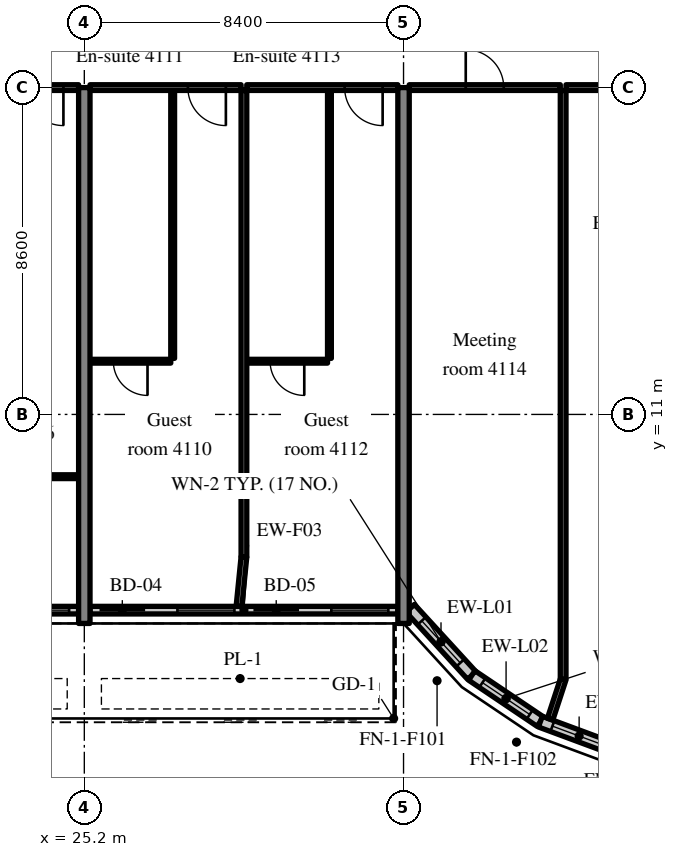
"""IFC4 building model, lengths in metres.
Left out: names, types, materials, properties, quantities, classifications, styles, units other than length and angle.
Written with IfcOpenShell. Run it as: python <this file> out.ifc"""

import sys

from ifc_helpers import new_model, si_unit, direction, frame, frame_2d, origin, place, context, subcontext, project, spatial, rectangle, extrude, source, transform, mapped, element, fill, save


model = new_model("IFC4")
c1 = context("Model", 3, precision=1e-05, world=origin(), true_north=direction((0.0, 1.0)))
c2 = subcontext(c1, "Body", "Model", "MODEL_VIEW")
j1 = project(units=[si_unit("LENGTHUNIT", "METRE"), si_unit("PLANEANGLEUNIT", "RADIAN")], contexts=[c1])
p1 = place(None, origin())
s1 = spatial("IfcSite", under=j1, at=p1, CompositionType="ELEMENT")
p2 = place(p1, origin())
s2 = spatial("IfcBuilding", under=s1, at=p2, CompositionType="ELEMENT")
p3 = place(p2, frame((0.0, 0.0, 170.6)))
s3 = spatial("IfcBuildingStorey", under=s2, at=p3, CompositionType="ELEMENT", Elevation=170.6)
m1 = source(origin(), c2, "Body", "SweptSolid", [
    extrude(rectangle(XDim=14.1, YDim=0.3, at=frame_2d((7.05, 0.0))), origin(), (0.0, 0.0, 1.0), 3.52),
])
for number, where, z_axis, x_axis in (
    (1, (25.2, 5.5, 0.0), (0.0, 0.0, 1.0), (0.0, 1.0, 0.0)),
    (2, (33.6, 5.5, 0.0), (0.0, 0.0, 1.0), (0.0, 1.0, 0.0)),
):
    element("IfcWall", number, at=place(p3, frame(where, z_axis=z_axis, x_axis=x_axis)), inside=s3, PredefinedType="SHEAR", context=c2, shape_type="MappedRepresentation", body=[
        mapped(m1, transform((0.0, 0.0, 0.0), scale=1.0)),
    ])
m2 = source(origin(), c2, "Body", "SweptSolid", [
    extrude(rectangle(XDim=8.1, YDim=0.2, at=frame_2d((4.05, 0.0))), origin(), (0.0, 0.0, 1.0), 2.87),
])
p4 = place(p3, frame((16.95, 5.85, 0.0), z_axis=(0.0, 0.0, 1.0), x_axis=(1.0, 0.0, 0.0)))
e3 = element("IfcWall", 3, at=p4, inside=s3, PredefinedType="SOLIDWALL", context=c2, shape_type="MappedRepresentation", body=[
    mapped(m2, transform((0.0, 0.0, 0.0), scale=1.0)),
])
m3 = source(origin(), c2, "Body", "SweptSolid", [
    extrude(rectangle(XDim=1.2, YDim=2.4, at=frame_2d((0.6, 1.2))), frame((0.0, 0.11, 0.0), z_axis=(0.0, -1.0, 0.0), x_axis=(1.0, 0.0, 0.0)), (0.0, 0.0, 1.0), 0.22),
])
p5 = place(p4, frame((0.25, 0.0, 0.0)))
e4 = element("IfcOpeningElement", 4, at=p5, cuts=e3, PredefinedType="OPENING", context=c2, shape_type="MappedRepresentation", body=[
    mapped(m3, transform((0.0, 0.0, 0.0), scale=1.0)),
])
m4 = source(origin(), c2, "Body", "SweptSolid", [
    extrude(rectangle(XDim=1.5, YDim=1.5, at=frame_2d((0.75, 0.75))), frame((0.0, 0.11, 0.0), z_axis=(0.0, -1.0, 0.0), x_axis=(1.0, 0.0, 0.0)), (0.0, 0.0, 1.0), 0.22),
])
p6 = place(p4, frame((2.3, 0.0, 0.9)))
e5 = element("IfcOpeningElement", 5, at=p6, cuts=e3, PredefinedType="OPENING", context=c2, shape_type="MappedRepresentation", body=[
    mapped(m4, transform((0.0, 0.0, 0.0), scale=1.0)),
])
p7 = place(p4, frame((4.3, 0.0, 0.0)))
e6 = element("IfcOpeningElement", 6, at=p7, cuts=e3, PredefinedType="OPENING", context=c2, shape_type="MappedRepresentation", body=[
    mapped(m3, transform((0.0, 0.0, 0.0), scale=1.0)),
])
p8 = place(p4, frame((6.35, 0.0, 0.9)))
e7 = element("IfcOpeningElement", 7, at=p8, cuts=e3, PredefinedType="OPENING", context=c2, shape_type="MappedRepresentation", body=[
    mapped(m4, transform((0.0, 0.0, 0.0), scale=1.0)),
])
m5 = source(origin(), c2, "Body", "SweptSolid", [
    extrude(rectangle(XDim=8.1, YDim=0.2, at=frame_2d((4.05, 0.0))), origin(), (0.0, 0.0, 1.0), 2.87),
])
p9 = place(p3, frame((25.35, 5.85, 0.0), z_axis=(0.0, 0.0, 1.0), x_axis=(1.0, 0.0, 0.0)))
e8 = element("IfcWall", 8, at=p9, inside=s3, PredefinedType="SOLIDWALL", context=c2, shape_type="MappedRepresentation", body=[
    mapped(m5, transform((0.0, 0.0, 0.0), scale=1.0)),
])
p10 = place(p9, frame((0.25, 0.0, 0.0)))
e9 = element("IfcOpeningElement", 9, at=p10, cuts=e8, PredefinedType="OPENING", context=c2, shape_type="MappedRepresentation", body=[
    mapped(m3, transform((0.0, 0.0, 0.0), scale=1.0)),
])
p11 = place(p9, frame((2.3, 0.0, 0.9)))
e10 = element("IfcOpeningElement", 10, at=p11, cuts=e8, PredefinedType="OPENING", context=c2, shape_type="MappedRepresentation", body=[
    mapped(m4, transform((0.0, 0.0, 0.0), scale=1.0)),
])
p12 = place(p9, frame((4.3, 0.0, 0.0)))
e11 = element("IfcOpeningElement", 11, at=p12, cuts=e8, PredefinedType="OPENING", context=c2, shape_type="MappedRepresentation", body=[
    mapped(m3, transform((0.0, 0.0, 0.0), scale=1.0)),
])
p13 = place(p9, frame((6.35, 0.0, 0.9)))
e12 = element("IfcOpeningElement", 12, at=p13, cuts=e8, PredefinedType="OPENING", context=c2, shape_type="MappedRepresentation", body=[
    mapped(m4, transform((0.0, 0.0, 0.0), scale=1.0)),
])
m6 = source(origin(), c2, "Body", "SweptSolid", [
    extrude(rectangle(XDim=2.398, YDim=0.3, at=frame_2d((1.199, 0.0))), origin(), (0.0, 0.0, 1.0), 3.52),
])
p14 = place(p3, frame((33.776, 5.9, 0.0), z_axis=(0.0, 0.0, 1.0), x_axis=(0.675374189419, -0.737475222815, 0.0)))
e13 = element("IfcWall", 13, at=p14, inside=s3, PredefinedType="SOLIDWALL", context=c2, shape_type="MappedRepresentation", body=[
    mapped(m6, transform((0.0, 0.0, 0.0), scale=1.0)),
])
m7 = source(origin(), c2, "Body", "SweptSolid", [
    extrude(rectangle(XDim=1.5, YDim=2.0, at=frame_2d((0.75, 1.0))), frame((0.0, 0.16, 0.0), z_axis=(0.0, -1.0, 0.0), x_axis=(1.0, 0.0, 0.0)), (0.0, 0.0, 1.0), 0.32),
])
p15 = place(p14, frame((0.449, 0.0, 0.9)))
e14 = element("IfcOpeningElement", 14, at=p15, cuts=e13, PredefinedType="OPENING", context=c2, shape_type="MappedRepresentation", body=[
    mapped(m7, transform((0.0, 0.0, 0.0), scale=1.0)),
])
m8 = source(origin(), c2, "Body", "SweptSolid", [
    extrude(rectangle(XDim=2.176, YDim=0.3, at=frame_2d((1.088, 0.0))), origin(), (0.0, 0.0, 1.0), 3.52),
])
p16 = place(p3, frame((35.396, 4.131, 0.0), z_axis=(0.0, 0.0, 1.0), x_axis=(0.829590746428, -0.558371913192, 0.0)))
e15 = element("IfcWall", 15, at=p16, inside=s3, PredefinedType="SOLIDWALL", context=c2, shape_type="MappedRepresentation", body=[
    mapped(m8, transform((0.0, 0.0, 0.0), scale=1.0)),
])
p17 = place(p16, frame((0.338, 0.0, 0.9)))
e16 = element("IfcOpeningElement", 16, at=p17, cuts=e15, PredefinedType="OPENING", context=c2, shape_type="MappedRepresentation", body=[
    mapped(m7, transform((0.0, 0.0, 0.0), scale=1.0)),
])
p18 = place(p3, frame((37.201, 2.917, 0.0), z_axis=(0.0, 0.0, 1.0), x_axis=(0.93754555999, -0.347862505801, 0.0)))
e17 = element("IfcWall", 17, at=p18, inside=s3, PredefinedType="SOLIDWALL", context=c2, shape_type="MappedRepresentation", body=[
    mapped(m8, transform((0.0, 0.0, 0.0), scale=1.0)),
])
p19 = place(p18, frame((0.338, 0.0, 0.9)))
e18 = element("IfcOpeningElement", 18, at=p19, cuts=e17, PredefinedType="OPENING", context=c2, shape_type="MappedRepresentation", body=[
    mapped(m7, transform((0.0, 0.0, 0.0), scale=1.0)),
])
m9 = source(origin(), c2, "Body", "SweptSolid", [
    extrude(rectangle(XDim=8.1, YDim=0.1, at=frame_2d((4.05, 0.0))), origin(), (0.0, 0.0, 1.0), 3.52),
])
p20 = place(p3, frame((16.95, 9.362, 0.0), z_axis=(0.0, 0.0, 1.0), x_axis=(1.0, 0.0, 0.0)))
e19 = element("IfcWall", 19, at=p20, inside=s3, PredefinedType="PARTITIONING", context=c2, shape_type="MappedRepresentation", body=[
    mapped(m9, transform((0.0, 0.0, 0.0), scale=1.0)),
])
m10 = source(origin(), c2, "Body", "SweptSolid", [
    extrude(rectangle(XDim=1.8, YDim=2.1, at=frame_2d((0.9, 1.05))), frame((0.0, 0.06, 0.0), z_axis=(0.0, -1.0, 0.0), x_axis=(1.0, 0.0, 0.0)), (0.0, 0.0, 1.0), 0.12),
])
p21 = place(p20, frame((3.15, 0.0, 0.0)))
e20 = element("IfcOpeningElement", 20, at=p21, cuts=e19, PredefinedType="OPENING", context=c2, shape_type="MappedRepresentation", body=[
    mapped(m10, transform((0.0, 0.0, 0.0), scale=1.0)),
])
m11 = source(origin(), c2, "Body", "SweptSolid", [
    extrude(rectangle(XDim=8.1, YDim=0.15, at=frame_2d((4.05, 0.0))), origin(), (0.0, 0.0, 1.0), 2.82),
])
p22 = place(p3, frame((16.95, 19.6, 0.0), z_axis=(0.0, 0.0, 1.0), x_axis=(1.0, 0.0, 0.0)))
e21 = element("IfcWall", 21, at=p22, inside=s3, PredefinedType="PARTITIONING", context=c2, shape_type="MappedRepresentation", body=[
    mapped(m11, transform((0.0, 0.0, 0.0), scale=1.0)),
])
m12 = source(origin(), c2, "Body", "SweptSolid", [
    extrude(rectangle(XDim=1.0, YDim=2.1, at=frame_2d((0.5, 1.05))), frame((0.0, 0.085, 0.0), z_axis=(0.0, -1.0, 0.0), x_axis=(1.0, 0.0, 0.0)), (0.0, 0.0, 1.0), 0.17),
])
p23 = place(p22, frame((6.7, 0.0, 0.0)))
e22 = element("IfcOpeningElement", 22, at=p23, cuts=e21, PredefinedType="OPENING", context=c2, shape_type="MappedRepresentation", body=[
    mapped(m12, transform((0.0, 0.0, 0.0), scale=1.0)),
])
m13 = source(origin(), c2, "Body", "SweptSolid", [
    extrude(rectangle(XDim=7.05, YDim=0.1, at=frame_2d((3.525, 0.0))), origin(), (0.0, 0.0, 1.0), 3.52),
])
p24 = place(p3, frame((27.525, 12.475, 0.0), z_axis=(0.0, 0.0, 1.0), x_axis=(0.0, 1.0, 0.0)))
e23 = element("IfcWall", 23, at=p24, inside=s3, PredefinedType="PARTITIONING", context=c2, shape_type="MappedRepresentation", body=[
    mapped(m13, transform((0.0, 0.0, 0.0), scale=1.0)),
])
m14 = source(origin(), c2, "Body", "SweptSolid", [
    extrude(rectangle(XDim=2.125, YDim=0.1, at=frame_2d((1.062, 0.0))), origin(), (0.0, 0.0, 1.0), 3.52),
])
p25 = place(p3, frame((25.35, 12.4, 0.0), z_axis=(0.0, 0.0, 1.0), x_axis=(1.0, 0.0, 0.0)))
e24 = element("IfcWall", 24, at=p25, inside=s3, PredefinedType="PARTITIONING", context=c2, shape_type="MappedRepresentation", body=[
    mapped(m14, transform((0.0, 0.0, 0.0), scale=1.0)),
])
m15 = source(origin(), c2, "Body", "SweptSolid", [
    extrude(rectangle(XDim=0.9, YDim=2.1, at=frame_2d((0.45, 1.05))), frame((0.0, 0.06, 0.0), z_axis=(0.0, -1.0, 0.0), x_axis=(1.0, 0.0, 0.0)), (0.0, 0.0, 1.0), 0.12),
])
p26 = place(p25, frame((0.613, 0.0, 0.0)))
e25 = element("IfcOpeningElement", 25, at=p26, cuts=e24, PredefinedType="OPENING", context=c2, shape_type="MappedRepresentation", body=[
    mapped(m15, transform((0.0, 0.0, 0.0), scale=1.0)),
])
m16 = source(origin(), c2, "Body", "SweptSolid", [
    extrude(rectangle(XDim=3.975, YDim=0.15, at=frame_2d((1.987, 0.0))), origin(), (0.0, 0.0, 1.0), 2.82),
])
p27 = place(p3, frame((25.35, 19.6, 0.0), z_axis=(0.0, 0.0, 1.0), x_axis=(1.0, 0.0, 0.0)))
e26 = element("IfcWall", 26, at=p27, inside=s3, PredefinedType="PARTITIONING", context=c2, shape_type="MappedRepresentation", body=[
    mapped(m16, transform((0.0, 0.0, 0.0), scale=1.0)),
])
p28 = place(p27, frame((2.575, 0.0, 0.0)))
e27 = element("IfcOpeningElement", 27, at=p28, cuts=e26, PredefinedType="OPENING", context=c2, shape_type="MappedRepresentation", body=[
    mapped(m12, transform((0.0, 0.0, 0.0), scale=1.0)),
])
p29 = place(p3, frame((31.65, 12.475, 0.0), z_axis=(0.0, 0.0, 1.0), x_axis=(0.0, 1.0, 0.0)))
e28 = element("IfcWall", 28, at=p29, inside=s3, PredefinedType="PARTITIONING", context=c2, shape_type="MappedRepresentation", body=[
    mapped(m13, transform((0.0, 0.0, 0.0), scale=1.0)),
])
p30 = place(p3, frame((29.475, 12.4, 0.0), z_axis=(0.0, 0.0, 1.0), x_axis=(1.0, 0.0, 0.0)))
e29 = element("IfcWall", 29, at=p30, inside=s3, PredefinedType="PARTITIONING", context=c2, shape_type="MappedRepresentation", body=[
    mapped(m14, transform((0.0, 0.0, 0.0), scale=1.0)),
])
p31 = place(p30, frame((0.613, 0.0, 0.0)))
e30 = element("IfcOpeningElement", 30, at=p31, cuts=e29, PredefinedType="OPENING", context=c2, shape_type="MappedRepresentation", body=[
    mapped(m15, transform((0.0, 0.0, 0.0), scale=1.0)),
])
p32 = place(p3, frame((29.475, 19.6, 0.0), z_axis=(0.0, 0.0, 1.0), x_axis=(1.0, 0.0, 0.0)))
e31 = element("IfcWall", 31, at=p32, inside=s3, PredefinedType="PARTITIONING", context=c2, shape_type="MappedRepresentation", body=[
    mapped(m16, transform((0.0, 0.0, 0.0), scale=1.0)),
])
p33 = place(p32, frame((2.575, 0.0, 0.0)))
e32 = element("IfcOpeningElement", 32, at=p33, cuts=e31, PredefinedType="OPENING", context=c2, shape_type="MappedRepresentation", body=[
    mapped(m12, transform((0.0, 0.0, 0.0), scale=1.0)),
])
m17 = source(origin(), c2, "Body", "SweptSolid", [
    extrude(rectangle(XDim=12.275, YDim=0.15, at=frame_2d((6.137, 0.0))), origin(), (0.0, 0.0, 1.0), 3.52),
])
p34 = place(p3, frame((29.4, 7.25, 0.0), z_axis=(0.0, 0.0, 1.0), x_axis=(0.0, 1.0, 0.0)))
e33 = element("IfcWall", 33, at=p34, inside=s3, PredefinedType="PARTITIONING", context=c2, shape_type="MappedRepresentation", body=[
    mapped(m17, transform((0.0, 0.0, 0.0), scale=1.0)),
])
m18 = source(origin(), c2, "Body", "SweptSolid", [
    extrude(rectangle(XDim=3.975, YDim=0.15, at=frame_2d((1.988, 0.0))), origin(), (0.0, 0.0, 1.0), 2.82),
])
p35 = place(p3, frame((33.75, 19.6, 0.0), z_axis=(0.0, 0.0, 1.0), x_axis=(1.0, 0.0, 0.0)))
e34 = element("IfcWall", 34, at=p35, inside=s3, PredefinedType="PARTITIONING", context=c2, shape_type="MappedRepresentation", body=[
    mapped(m18, transform((0.0, 0.0, 0.0), scale=1.0)),
])
p36 = place(p35, frame((1.487, 0.0, 0.0)))
e35 = element("IfcOpeningElement", 35, at=p36, cuts=e34, PredefinedType="OPENING", context=c2, shape_type="MappedRepresentation", body=[
    mapped(m12, transform((0.0, 0.0, 0.0), scale=1.0)),
])
p37 = place(p3, frame((37.875, 19.6, 0.0), z_axis=(0.0, 0.0, 1.0), x_axis=(1.0, 0.0, 0.0)))
e36 = element("IfcWall", 36, at=p37, inside=s3, PredefinedType="PARTITIONING", context=c2, shape_type="MappedRepresentation", body=[
    mapped(m18, transform((0.0, 0.0, 0.0), scale=1.0)),
])
p38 = place(p37, frame((1.487, 0.0, 0.0)))
e37 = element("IfcOpeningElement", 37, at=p38, cuts=e36, PredefinedType="OPENING", context=c2, shape_type="MappedRepresentation", body=[
    mapped(m12, transform((0.0, 0.0, 0.0), scale=1.0)),
])
m19 = source(origin(), c2, "Body", "SweptSolid", [
    extrude(rectangle(XDim=15.498, YDim=0.15, at=frame_2d((7.749, 0.0))), origin(), (0.0, 0.0, 1.0), 3.52),
])
p39 = place(p3, frame((37.8, 4.027, 0.0), z_axis=(0.0, 0.0, 1.0), x_axis=(0.0, 1.0, 0.0)))
e38 = element("IfcWall", 38, at=p39, inside=s3, PredefinedType="PARTITIONING", context=c2, shape_type="MappedRepresentation", body=[
    mapped(m19, transform((0.0, 0.0, 0.0), scale=1.0)),
])
m20 = source(origin(), c2, "Body", "SweptSolid", [
    extrude(rectangle(XDim=1.307, YDim=0.15, at=frame_2d((0.653, 0.0))), origin(), (0.0, 0.0, 1.0), 3.52),
])
p40 = place(p3, frame((29.27, 5.95, 0.0), z_axis=(0.0, 0.0, 1.0), x_axis=(0.099411212066, 0.995046436562, 0.0)))
e39 = element("IfcWall", 39, at=p40, inside=s3, PredefinedType="PARTITIONING", context=c2, shape_type="MappedRepresentation", body=[
    mapped(m20, transform((0.0, 0.0, 0.0), scale=1.0)),
])
m21 = source(origin(), c2, "Body", "SweptSolid", [
    extrude(rectangle(XDim=1.101, YDim=0.15, at=frame_2d((0.55, 0.0))), origin(), (0.0, 0.0, 1.0), 3.52),
])
p41 = place(p3, frame((37.457, 2.981, 0.0), z_axis=(0.0, 0.0, 1.0), x_axis=(0.311567081539, 0.950224159712, 0.0)))
e40 = element("IfcWall", 40, at=p41, inside=s3, PredefinedType="PARTITIONING", context=c2, shape_type="MappedRepresentation", body=[
    mapped(m21, transform((0.0, 0.0, 0.0), scale=1.0)),
])
m22 = source(origin(), c2, "Body", "SweptSolid", [
    extrude(rectangle(XDim=1.5, YDim=1.5, at=frame_2d((0.75, 0.75))), frame((0.0, 0.03, 0.0), z_axis=(0.0, -1.0, 0.0), x_axis=(1.0, 0.0, 0.0)), (0.0, 0.0, 1.0), 0.06),
])
p42 = place(p8, origin())
e41 = element("IfcWindow", 41, at=p42, inside=s3, PartitioningType="SINGLE_PANEL", PredefinedType="WINDOW", context=c2, shape_type="MappedRepresentation", body=[
    mapped(m22, transform((0.0, 0.0, 0.0), scale=1.0)),
])
fill(e7, e41)
m23 = source(origin(), c2, "Body", "SweptSolid", [
    extrude(rectangle(XDim=1.2, YDim=2.4, at=frame_2d((0.6, 1.2))), frame((0.0, 0.025, 0.0), z_axis=(0.0, -1.0, 0.0), x_axis=(1.0, 0.0, 0.0)), (0.0, 0.0, 1.0), 0.05),
])
p43 = place(p10, origin())
e42 = element("IfcDoor", 42, at=p43, inside=s3, OperationType="SLIDING_TO_RIGHT", PredefinedType="DOOR", context=c2, shape_type="MappedRepresentation", body=[
    mapped(m23, transform((0.0, 0.0, 0.0), scale=1.0)),
])
fill(e9, e42)
p44 = place(p11, origin())
e43 = element("IfcWindow", 43, at=p44, inside=s3, PartitioningType="SINGLE_PANEL", PredefinedType="WINDOW", context=c2, shape_type="MappedRepresentation", body=[
    mapped(m22, transform((0.0, 0.0, 0.0), scale=1.0)),
])
fill(e10, e43)
p45 = place(p12, origin())
e44 = element("IfcDoor", 44, at=p45, inside=s3, OperationType="SLIDING_TO_LEFT", PredefinedType="DOOR", context=c2, shape_type="MappedRepresentation", body=[
    mapped(m23, transform((0.0, 0.0, 0.0), scale=1.0)),
])
fill(e11, e44)
p46 = place(p13, origin())
e45 = element("IfcWindow", 45, at=p46, inside=s3, PartitioningType="SINGLE_PANEL", PredefinedType="WINDOW", context=c2, shape_type="MappedRepresentation", body=[
    mapped(m22, transform((0.0, 0.0, 0.0), scale=1.0)),
])
fill(e12, e45)
m24 = source(origin(), c2, "Body", "SweptSolid", [
    extrude(rectangle(XDim=1.5, YDim=2.0, at=frame_2d((0.75, 1.0))), frame((0.0, 0.03, 0.0), z_axis=(0.0, -1.0, 0.0), x_axis=(1.0, 0.0, 0.0)), (0.0, 0.0, 1.0), 0.06),
])
p47 = place(p15, origin())
e46 = element("IfcWindow", 46, at=p47, inside=s3, PartitioningType="SINGLE_PANEL", PredefinedType="WINDOW", context=c2, shape_type="MappedRepresentation", body=[
    mapped(m24, transform((0.0, 0.0, 0.0), scale=1.0)),
])
fill(e14, e46)
p48 = place(p17, origin())
e47 = element("IfcWindow", 47, at=p48, inside=s3, PartitioningType="SINGLE_PANEL", PredefinedType="WINDOW", context=c2, shape_type="MappedRepresentation", body=[
    mapped(m24, transform((0.0, 0.0, 0.0), scale=1.0)),
])
fill(e16, e47)
p49 = place(p19, origin())
e48 = element("IfcWindow", 48, at=p49, inside=s3, PartitioningType="SINGLE_PANEL", PredefinedType="WINDOW", context=c2, shape_type="MappedRepresentation", body=[
    mapped(m24, transform((0.0, 0.0, 0.0), scale=1.0)),
])
fill(e18, e48)
m25 = source(origin(), c2, "Body", "SweptSolid", [
    extrude(rectangle(XDim=1.0, YDim=2.1, at=frame_2d((0.5, 1.05))), frame((0.0, 0.025, 0.0), z_axis=(0.0, -1.0, 0.0), x_axis=(1.0, 0.0, 0.0)), (0.0, 0.0, 1.0), 0.05),
])
p50 = place(p23, origin())
e49 = element("IfcDoor", 49, at=p50, inside=s3, OperationType="SINGLE_SWING_RIGHT", PredefinedType="DOOR", context=c2, shape_type="MappedRepresentation", body=[
    mapped(m25, transform((0.0, 0.0, 0.0), scale=1.0)),
])
fill(e22, e49)
m26 = source(origin(), c2, "Body", "SweptSolid", [
    extrude(rectangle(XDim=0.9, YDim=2.1, at=frame_2d((0.45, 1.05))), frame((0.0, 0.025, 0.0), z_axis=(0.0, -1.0, 0.0), x_axis=(1.0, 0.0, 0.0)), (0.0, 0.0, 1.0), 0.05),
])
p51 = place(p26, origin())
e50 = element("IfcDoor", 50, at=p51, inside=s3, OperationType="SINGLE_SWING_RIGHT", PredefinedType="DOOR", context=c2, shape_type="MappedRepresentation", body=[
    mapped(m26, transform((0.0, 0.0, 0.0), scale=1.0)),
])
fill(e25, e50)
p52 = place(p28, origin())
e51 = element("IfcDoor", 51, at=p52, inside=s3, OperationType="SINGLE_SWING_RIGHT", PredefinedType="DOOR", context=c2, shape_type="MappedRepresentation", body=[
    mapped(m25, transform((0.0, 0.0, 0.0), scale=1.0)),
])
fill(e27, e51)
p53 = place(p31, origin())
e52 = element("IfcDoor", 52, at=p53, inside=s3, OperationType="SINGLE_SWING_RIGHT", PredefinedType="DOOR", context=c2, shape_type="MappedRepresentation", body=[
    mapped(m26, transform((0.0, 0.0, 0.0), scale=1.0)),
])
fill(e30, e52)
p54 = place(p33, origin())
e53 = element("IfcDoor", 53, at=p54, inside=s3, OperationType="SINGLE_SWING_RIGHT", PredefinedType="DOOR", context=c2, shape_type="MappedRepresentation", body=[
    mapped(m25, transform((0.0, 0.0, 0.0), scale=1.0)),
])
fill(e32, e53)
p55 = place(p36, origin())
e54 = element("IfcDoor", 54, at=p55, inside=s3, OperationType="SINGLE_SWING_LEFT", PredefinedType="DOOR", context=c2, shape_type="MappedRepresentation", body=[
    mapped(m25, transform((0.0, 0.0, 0.0), scale=1.0)),
])
fill(e35, e54)
save(model, sys.argv[1])
